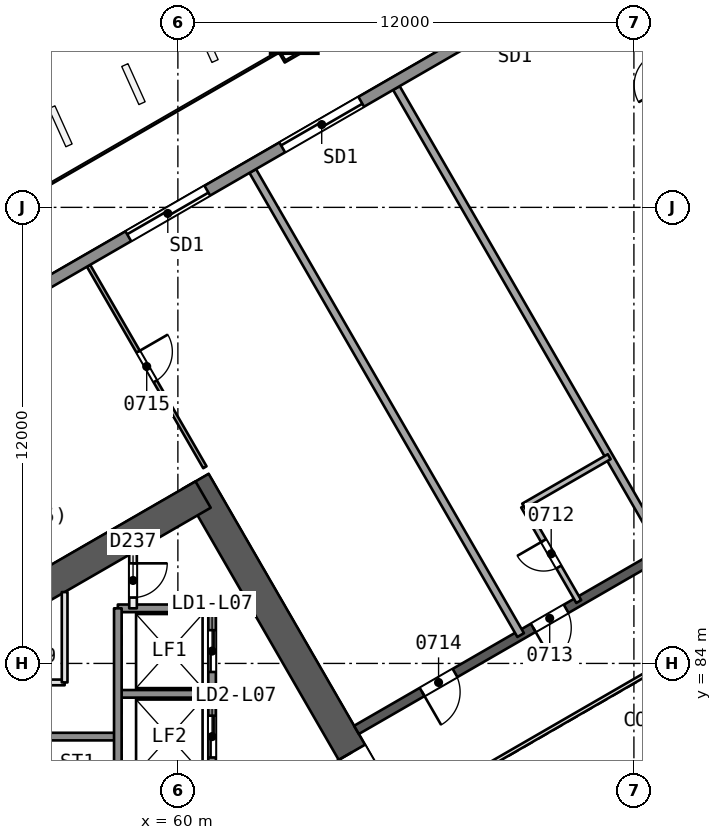
"""IFC4 building model, lengths in metres.
Left out: names, types, materials, properties, quantities, classifications, styles, units other than length and angle.
Written with IfcOpenShell. Run it as: python <this file> out.ifc"""

import sys

from ifc_helpers import new_model, si_unit, direction, frame, frame_2d, origin, origin_2d, place, context, subcontext, project, spatial, rectangle, extrude, element, fill, save


model = new_model("IFC4")
c1 = context("Model", 3, precision=1e-05, world=origin(), true_north=direction((0.0, 1.0)))
c2 = subcontext(c1, "Body", "Model", "MODEL_VIEW")
j1 = project(units=[si_unit("LENGTHUNIT", "METRE"), si_unit("PLANEANGLEUNIT", "RADIAN")], contexts=[c1])
p1 = place(None, origin())
s1 = spatial("IfcSite", under=j1, at=p1, CompositionType="ELEMENT")
p2 = place(p1, origin())
s2 = spatial("IfcBuilding", under=s1, at=p2, CompositionType="ELEMENT")
p3 = place(p2, frame((0.0, 0.0, 37.4)))
s3 = spatial("IfcBuildingStorey", under=s2, at=p3, CompositionType="ELEMENT", Elevation=37.4)
p4 = place(p3, frame((65.538, 80.0, 0.0), z_axis=(0.0, 0.0, 1.0), x_axis=(-0.49999662545, 0.866027352073, 0.0)))
e1 = element("IfcWall", 1, at=p4, inside=s3, PredefinedType="SHEAR", context=c2, shape_type="SweptSolid", body=[
    extrude(rectangle(XDim=10.149, YDim=0.8, at=frame_2d((5.074, 0.0))), origin(), (0.0, 0.0, 1.0), 3.7),
])
p5 = place(p4, frame((0.719, 0.0, 0.0)))
e2 = element("IfcOpeningElement", 2, at=p5, cuts=e1, PredefinedType="OPENING", context=c2, shape_type="SweptSolid", body=[
    extrude(rectangle(XDim=1.2, YDim=2.1, at=frame_2d((0.6, 1.05))), frame((0.0, 0.411, 0.0), z_axis=(0.0, -1.0, 0.0), x_axis=(1.0, 0.0, 0.0)), (0.0, 0.0, 1.0), 0.821),
])
p6 = place(p3, frame((60.664, 88.443, 0.0), z_axis=(0.0, 0.0, 1.0), x_axis=(-0.866029478545, -0.499992942241, 0.0)))
e3 = element("IfcWall", 3, at=p6, inside=s3, PredefinedType="SHEAR", context=c2, shape_type="SweptSolid", body=[
    extrude(rectangle(XDim=13.933, YDim=0.8, at=frame_2d((6.967, 0.0))), origin(), (0.0, 0.0, 1.0), 3.7),
])
p7 = place(p3, frame((78.2, 90.046, 0.0), z_axis=(0.0, 0.0, 1.0), x_axis=(-0.866026492143, -0.499998114903, 0.0)))
e4 = element("IfcWall", 4, at=p7, inside=s3, PredefinedType="SHEAR", context=c2, shape_type="SweptSolid", body=[
    extrude(rectangle(XDim=15.588, YDim=0.25, at=frame_2d((7.794, 0.0))), origin(), (0.0, 0.0, 1.0), 3.2),
])
p8 = place(p7, frame((2.618, 0.0, 0.0)))
e5 = element("IfcOpeningElement", 5, at=p8, cuts=e4, PredefinedType="OPENING", context=c2, shape_type="SweptSolid", body=[
    extrude(rectangle(XDim=1.0, YDim=2.1, at=frame_2d((0.5, 1.05))), frame((0.0, 0.135, 0.0), z_axis=(0.0, -1.0, 0.0), x_axis=(1.0, 0.0, 0.0)), (0.0, 0.0, 1.0), 0.271),
])
p9 = place(p7, frame((9.218, 0.0, 0.0)))
e6 = element("IfcOpeningElement", 6, at=p9, cuts=e4, PredefinedType="OPENING", context=c2, shape_type="SweptSolid", body=[
    extrude(rectangle(XDim=1.0, YDim=2.1, at=frame_2d((0.5, 1.05))), frame((0.0, 0.135, 0.0), z_axis=(0.0, -1.0, 0.0), x_axis=(1.0, 0.0, 0.0)), (0.0, 0.0, 1.0), 0.271),
])
p10 = place(p7, frame((12.594, 0.0, 0.0)))
e7 = element("IfcOpeningElement", 7, at=p10, cuts=e4, PredefinedType="OPENING", context=c2, shape_type="SweptSolid", body=[
    extrude(rectangle(XDim=1.0, YDim=2.1, at=frame_2d((0.5, 1.05))), frame((0.0, 0.135, 0.0), z_axis=(0.0, -1.0, 0.0), x_axis=(1.0, 0.0, 0.0)), (0.0, 0.0, 1.0), 0.271),
])
p11 = place(p3, frame((63.05, 100.698, 0.0), z_axis=(0.010092954999, -0.017481261926, 0.999796248113), x_axis=(-0.499897099477, 0.865849541015, 0.020185694417)))
e8 = element("IfcColumn", 8, at=p11, inside=s3, PredefinedType="COLUMN", context=c2, shape_type="SweptSolid", body=[
    extrude(rectangle(XDim=1.2, YDim=1.2, at=origin_2d()), origin(), (0.0, 0.0, 1.0), 3.701),
])
p12 = place(p3, frame((74.21, 96.956, 0.0), z_axis=(0.0, 0.0, 1.0), x_axis=(-0.499985929336, 0.866033527334, 0.0)))
e9 = element("IfcWall", 9, at=p12, inside=s3, PredefinedType="PARTITIONING", context=c2, shape_type="SweptSolid", body=[
    extrude(rectangle(XDim=6.123, YDim=0.1, at=frame_2d((3.062, 0.0))), origin(), (0.0, 0.0, 1.0), 3.2),
])
p13 = place(p12, frame((2.611, 0.0, 0.0)))
e10 = element("IfcOpeningElement", 10, at=p13, cuts=e9, PredefinedType="OPENING", context=c2, shape_type="SweptSolid", body=[
    extrude(rectangle(XDim=0.9, YDim=2.1, at=frame_2d((0.45, 1.05))), frame((0.0, 0.061, 0.0), z_axis=(0.0, -1.0, 0.0), x_axis=(1.0, 0.0, 0.0)), (0.0, 0.0, 1.0), 0.121),
])
p14 = place(p3, frame((65.749, 99.141, 0.0), z_axis=(0.0, 0.0, 1.0), x_axis=(0.499997206141, -0.866027016814, 0.0)))
e11 = element("IfcWall", 11, at=p14, inside=s3, PredefinedType="PARTITIONING", context=c2, shape_type="SweptSolid", body=[
    extrude(rectangle(XDim=14.102, YDim=0.2, at=frame_2d((7.051, 0.0))), origin(), (0.0, 0.0, 1.0), 3.2),
])
p15 = place(p3, frame((70.548, 85.628, 0.0), z_axis=(0.0, 0.0, 1.0), x_axis=(-0.499987231761, 0.866032775405, 0.0)))
e12 = element("IfcWall", 12, at=p15, inside=s3, PredefinedType="PARTITIONING", context=c2, shape_type="SweptSolid", body=[
    extrude(rectangle(XDim=2.9, YDim=0.15, at=frame_2d((1.45, 0.0))), origin(), (0.0, 0.0, 1.0), 3.2),
])
p16 = place(p15, frame((1.05, 0.0, 0.0)))
e13 = element("IfcOpeningElement", 13, at=p16, cuts=e12, PredefinedType="OPENING", context=c2, shape_type="SweptSolid", body=[
    extrude(rectangle(XDim=0.8, YDim=2.1, at=frame_2d((0.4, 1.05))), frame((0.0, 0.085, 0.0), z_axis=(0.0, -1.0, 0.0), x_axis=(1.0, 0.0, 0.0)), (0.0, 0.0, 1.0), 0.171),
])
p17 = place(p3, frame((69.098, 88.14, 0.0), z_axis=(0.0, 0.0, 1.0), x_axis=(0.866021400173, 0.500006934395, 0.0)))
e14 = element("IfcWall", 14, at=p17, inside=s3, PredefinedType="PARTITIONING", context=c2, shape_type="SweptSolid", body=[
    extrude(rectangle(XDim=2.6, YDim=0.15, at=frame_2d((1.3, 0.0))), origin(), (0.0, 0.0, 1.0), 3.2),
])
p18 = place(p3, frame((61.969, 96.958, 0.0), z_axis=(0.0, 0.0, 1.0), x_axis=(0.499997206141, -0.866027016814, 0.0)))
e15 = element("IfcWall", 15, at=p18, inside=s3, PredefinedType="PARTITIONING", context=c2, shape_type="SweptSolid", body=[
    extrude(rectangle(XDim=14.102, YDim=0.2, at=frame_2d((7.051, 0.0))), origin(), (0.0, 0.0, 1.0), 3.2),
])
p19 = place(p3, frame((57.649, 94.464, 0.0), z_axis=(0.0, 0.0, 1.0), x_axis=(0.499985929336, -0.866033527334, 0.0)))
e16 = element("IfcWall", 16, at=p19, inside=s3, PredefinedType="PARTITIONING", context=c2, shape_type="SweptSolid", body=[
    extrude(rectangle(XDim=6.123, YDim=0.1, at=frame_2d((3.062, 0.0))), origin(), (0.0, 0.0, 1.0), 3.2),
])
p20 = place(p19, frame((2.611, 0.0, 0.0)))
e17 = element("IfcOpeningElement", 17, at=p20, cuts=e16, PredefinedType="OPENING", context=c2, shape_type="SweptSolid", body=[
    extrude(rectangle(XDim=0.9, YDim=2.1, at=frame_2d((0.45, 1.05))), frame((0.0, 0.061, 0.0), z_axis=(0.0, -1.0, 0.0), x_axis=(1.0, 0.0, 0.0)), (0.0, 0.0, 1.0), 0.121),
])
p21 = place(p3, frame((37.74, 83.141, 0.0), z_axis=(0.0, 0.0, 1.0), x_axis=(0.866026524777, 0.499998058379, 0.0)))
e18 = element("IfcWall", 18, at=p21, inside=s3, PredefinedType="SOLIDWALL", context=c2, shape_type="SweptSolid", body=[
    extrude(rectangle(XDim=61.395, YDim=0.3, at=frame_2d((30.698, 0.0))), origin(), (0.0, 0.0, 1.0), 3.2),
])
p22 = place(p21, frame((34.174, 0.0, 0.0)))
e19 = element("IfcOpeningElement", 19, at=p22, cuts=e18, PredefinedType="OPENING", context=c2, shape_type="SweptSolid", body=[
    extrude(rectangle(XDim=2.4, YDim=2.4, at=frame_2d((1.2, 1.2))), frame((0.0, 0.161, 0.0), z_axis=(0.0, -1.0, 0.0), x_axis=(1.0, 0.0, 0.0)), (0.0, 0.0, 1.0), 0.321),
])
p23 = place(p21, frame((47.603, 0.0, 0.0)))
e20 = element("IfcOpeningElement", 20, at=p23, cuts=e18, PredefinedType="OPENING", context=c2, shape_type="SweptSolid", body=[
    extrude(rectangle(XDim=2.4, YDim=2.4, at=frame_2d((1.2, 1.2))), frame((0.0, 0.161, 0.0), z_axis=(0.0, -1.0, 0.0), x_axis=(1.0, 0.0, 0.0)), (0.0, 0.0, 1.0), 0.321),
])
p24 = place(p21, frame((24.198, 0.0, 0.0)))
e21 = element("IfcOpeningElement", 21, at=p24, cuts=e18, PredefinedType="OPENING", context=c2, shape_type="SweptSolid", body=[
    extrude(rectangle(XDim=2.4, YDim=2.4, at=frame_2d((1.2, 1.2))), frame((0.0, 0.161, 0.0), z_axis=(0.0, -1.0, 0.0), x_axis=(1.0, 0.0, 0.0)), (0.0, 0.0, 1.0), 0.321),
])
p25 = place(p21, frame((11.394, 0.0, 0.0)))
e22 = element("IfcOpeningElement", 22, at=p25, cuts=e18, PredefinedType="OPENING", context=c2, shape_type="SweptSolid", body=[
    extrude(rectangle(XDim=2.4, YDim=2.4, at=frame_2d((1.2, 1.2))), frame((0.0, 0.161, 0.0), z_axis=(0.0, -1.0, 0.0), x_axis=(1.0, 0.0, 0.0)), (0.0, 0.0, 1.0), 0.321),
])
p26 = place(p21, frame((28.874, 0.0, 0.0)))
e23 = element("IfcOpeningElement", 23, at=p26, cuts=e18, PredefinedType="OPENING", context=c2, shape_type="SweptSolid", body=[
    extrude(rectangle(XDim=2.4, YDim=2.4, at=frame_2d((1.2, 1.2))), frame((0.0, 0.161, 0.0), z_axis=(0.0, -1.0, 0.0), x_axis=(1.0, 0.0, 0.0)), (0.0, 0.0, 1.0), 0.321),
])
p27 = place(p3, frame((60.9, 85.45, 0.0), z_axis=(0.0, 0.0, 1.0), x_axis=(-1.0, 0.0, 0.0)))
e24 = element("IfcWall", 24, at=p27, inside=s3, PredefinedType="SOLIDWALL", context=c2, shape_type="SweptSolid", body=[
    extrude(rectangle(XDim=2.48, YDim=0.2, at=frame_2d((1.24, 0.0))), origin(), (0.0, 0.0, 1.0), 3.2),
])
p28 = place(p3, frame((57.02, 83.5, 0.0), z_axis=(0.0, 0.0, 1.0), x_axis=(-1.0, 0.0, 0.0)))
e25 = element("IfcWall", 25, at=p28, inside=s3, PredefinedType="PARTITIONING", context=c2, shape_type="SweptSolid", body=[
    extrude(rectangle(XDim=1.6, YDim=0.15, at=frame_2d((0.8, 0.0))), origin(), (0.0, 0.0, 1.0), 3.2),
])
p29 = place(p28, frame((0.387, 0.0, 0.0)))
e26 = element("IfcOpeningElement", 26, at=p29, cuts=e25, PredefinedType="OPENING", context=c2, shape_type="SweptSolid", body=[
    extrude(rectangle(XDim=0.9, YDim=2.1, at=frame_2d((0.45, 1.05))), frame((0.0, 0.085, 0.0), z_axis=(0.0, -1.0, 0.0), x_axis=(1.0, 0.0, 0.0)), (0.0, 0.0, 1.0), 0.171),
])
p30 = place(p3, frame((60.9, 83.2, 0.0), z_axis=(0.0, 0.0, 1.0), x_axis=(-1.0, 0.0, 0.0)))
e27 = element("IfcWall", 27, at=p30, inside=s3, PredefinedType="SOLIDWALL", context=c2, shape_type="SweptSolid", body=[
    extrude(rectangle(XDim=2.48, YDim=0.2, at=frame_2d((1.24, 0.0))), origin(), (0.0, 0.0, 1.0), 3.2),
])
p31 = place(p3, frame((58.42, 82.075, 0.0), z_axis=(0.0, 0.0, 1.0), x_axis=(-1.0, 0.0, 0.0)))
e28 = element("IfcWall", 28, at=p31, inside=s3, PredefinedType="SOLIDWALL", context=c2, shape_type="SweptSolid", body=[
    extrude(rectangle(XDim=7.7, YDim=0.2, at=frame_2d((3.85, 0.0))), origin(), (0.0, 0.0, 1.0), 3.2),
])
p32 = place(p3, frame((60.9, 85.45, 0.0), z_axis=(0.0, 0.0, 1.0), x_axis=(0.0, -1.0, 0.0)))
e29 = element("IfcWall", 29, at=p32, inside=s3, PredefinedType="SOLIDWALL", context=c2, shape_type="SweptSolid", body=[
    extrude(rectangle(XDim=10.9, YDim=0.2, at=frame_2d((5.45, 0.0))), origin(), (0.0, 0.0, 1.0), 3.2),
])
p33 = place(p32, frame((0.575, 0.0, 0.0)))
e30 = element("IfcOpeningElement", 30, at=p33, cuts=e29, PredefinedType="OPENING", context=c2, shape_type="SweptSolid", body=[
    extrude(rectangle(XDim=1.1, YDim=2.1, at=frame_2d((0.55, 1.05))), frame((0.0, 0.11, 0.0), z_axis=(0.0, -1.0, 0.0), x_axis=(1.0, 0.0, 0.0)), (0.0, 0.0, 1.0), 0.221),
])
p34 = place(p32, frame((2.825, 0.0, 0.0)))
e31 = element("IfcOpeningElement", 31, at=p34, cuts=e29, PredefinedType="OPENING", context=c2, shape_type="SweptSolid", body=[
    extrude(rectangle(XDim=1.1, YDim=2.1, at=frame_2d((0.55, 1.05))), frame((0.0, 0.11, 0.0), z_axis=(0.0, -1.0, 0.0), x_axis=(1.0, 0.0, 0.0)), (0.0, 0.0, 1.0), 0.221),
])
p35 = place(p32, frame((5.075, 0.0, 0.0)))
e32 = element("IfcOpeningElement", 32, at=p35, cuts=e29, PredefinedType="OPENING", context=c2, shape_type="SweptSolid", body=[
    extrude(rectangle(XDim=1.1, YDim=2.1, at=frame_2d((0.55, 1.05))), frame((0.0, 0.11, 0.0), z_axis=(0.0, -1.0, 0.0), x_axis=(1.0, 0.0, 0.0)), (0.0, 0.0, 1.0), 0.221),
])
p36 = place(p32, frame((7.325, 0.0, 0.0)))
e33 = element("IfcOpeningElement", 33, at=p36, cuts=e29, PredefinedType="OPENING", context=c2, shape_type="SweptSolid", body=[
    extrude(rectangle(XDim=1.1, YDim=2.1, at=frame_2d((0.55, 1.05))), frame((0.0, 0.11, 0.0), z_axis=(0.0, -1.0, 0.0), x_axis=(1.0, 0.0, 0.0)), (0.0, 0.0, 1.0), 0.221),
])
p37 = place(p3, frame((58.82, 86.917, 0.0), z_axis=(0.0, 0.0, 1.0), x_axis=(0.0, -1.0, 0.0)))
e34 = element("IfcWall", 34, at=p37, inside=s3, PredefinedType="PARTITIONING", context=c2, shape_type="SweptSolid", body=[
    extrude(rectangle(XDim=1.467, YDim=0.2, at=frame_2d((0.733, 0.0))), origin(), (0.0, 0.0, 1.0), 3.2),
])
p38 = place(p37, frame((0.283, 0.0, 0.0)))
e35 = element("IfcOpeningElement", 35, at=p38, cuts=e34, PredefinedType="OPENING", context=c2, shape_type="SweptSolid", body=[
    extrude(rectangle(XDim=0.9, YDim=2.1, at=frame_2d((0.45, 1.05))), frame((0.0, 0.11, 0.0), z_axis=(0.0, -1.0, 0.0), x_axis=(1.0, 0.0, 0.0)), (0.0, 0.0, 1.0), 0.221),
])
p39 = place(p3, frame((58.42, 85.45, 0.0), z_axis=(0.0, 0.0, 1.0), x_axis=(0.0, -1.0, 0.0)))
e36 = element("IfcWall", 36, at=p39, inside=s3, PredefinedType="SOLIDWALL", context=c2, shape_type="SweptSolid", body=[
    extrude(rectangle(XDim=9.0, YDim=0.2, at=frame_2d((4.5, 0.0))), origin(), (0.0, 0.0, 1.0), 3.2),
])
p40 = place(p3, frame((57.02, 85.877, 0.0), z_axis=(0.0, 0.0, 1.0), x_axis=(0.0, -1.0, 0.0)))
e37 = element("IfcWall", 37, at=p40, inside=s3, PredefinedType="PARTITIONING", context=c2, shape_type="SweptSolid", body=[
    extrude(rectangle(XDim=2.377, YDim=0.15, at=frame_2d((1.189, 0.0))), origin(), (0.0, 0.0, 1.0), 3.2),
])
p41 = place(p3, frame((77.738, 86.846, 0.0), z_axis=(0.0, 0.0, 1.0), x_axis=(-0.866026658274, -0.499997827154, 0.0)))
e38 = element("IfcWall", 38, at=p41, inside=s3, PredefinedType="PARTITIONING", context=c2, shape_type="SweptSolid", body=[
    extrude(rectangle(XDim=11.588, YDim=0.1, at=frame_2d((5.794, 0.0))), origin(), (0.0, 0.0, 1.0), 3.2),
])
p42 = place(p16, origin())
e39 = element("IfcDoor", 39, at=p42, inside=s3, OperationType="SINGLE_SWING_RIGHT", PredefinedType="NOTDEFINED", context=c2, shape_type="SweptSolid", body=[
    extrude(rectangle(XDim=0.8, YDim=2.1, at=frame_2d((0.4, 1.05))), frame((0.0, 0.025, 0.0), z_axis=(0.0, -1.0, 0.0), x_axis=(1.0, 0.0, 0.0)), (0.0, 0.0, 1.0), 0.05),
])
fill(e13, e39)
p43 = place(p9, origin())
e40 = element("IfcDoor", 40, at=p43, inside=s3, OperationType="SINGLE_SWING_RIGHT", PredefinedType="NOTDEFINED", context=c2, shape_type="SweptSolid", body=[
    extrude(rectangle(XDim=1.0, YDim=2.1, at=frame_2d((0.5, 1.05))), frame((0.0, 0.025, 0.0), z_axis=(0.0, -1.0, 0.0), x_axis=(1.0, 0.0, 0.0)), (0.0, 0.0, 1.0), 0.05),
])
fill(e6, e40)
p44 = place(p10, origin())
e41 = element("IfcDoor", 41, at=p44, inside=s3, OperationType="SINGLE_SWING_RIGHT", PredefinedType="NOTDEFINED", context=c2, shape_type="SweptSolid", body=[
    extrude(rectangle(XDim=1.0, YDim=2.1, at=frame_2d((0.5, 1.05))), frame((0.0, 0.025, 0.0), z_axis=(0.0, -1.0, 0.0), x_axis=(1.0, 0.0, 0.0)), (0.0, 0.0, 1.0), 0.05),
])
fill(e7, e41)
p45 = place(p20, origin())
e42 = element("IfcDoor", 42, at=p45, inside=s3, OperationType="SINGLE_SWING_LEFT", PredefinedType="NOTDEFINED", context=c2, shape_type="SweptSolid", body=[
    extrude(rectangle(XDim=0.9, YDim=2.1, at=frame_2d((0.45, 1.05))), frame((0.0, 0.025, 0.0), z_axis=(0.0, -1.0, 0.0), x_axis=(1.0, 0.0, 0.0)), (0.0, 0.0, 1.0), 0.05),
])
fill(e17, e42)
p46 = place(p24, origin())
e43 = element("IfcDoor", 43, at=p46, inside=s3, OperationType="SLIDING_TO_LEFT", PredefinedType="NOTDEFINED", context=c2, shape_type="SweptSolid", body=[
    extrude(rectangle(XDim=2.4, YDim=2.4, at=frame_2d((1.2, 1.2))), frame((0.0, 0.025, 0.0), z_axis=(0.0, -1.0, 0.0), x_axis=(1.0, 0.0, 0.0)), (0.0, 0.0, 1.0), 0.05),
])
fill(e21, e43)
p47 = place(p26, origin())
e44 = element("IfcDoor", 44, at=p47, inside=s3, OperationType="SLIDING_TO_LEFT", PredefinedType="NOTDEFINED", context=c2, shape_type="SweptSolid", body=[
    extrude(rectangle(XDim=2.4, YDim=2.4, at=frame_2d((1.2, 1.2))), frame((0.0, 0.025, 0.0), z_axis=(0.0, -1.0, 0.0), x_axis=(1.0, 0.0, 0.0)), (0.0, 0.0, 1.0), 0.05),
])
fill(e23, e44)
p48 = place(p5, origin())
e45 = element("IfcDoor", 45, at=p48, inside=s3, OperationType="SINGLE_SWING_RIGHT", PredefinedType="NOTDEFINED", context=c2, shape_type="SweptSolid", body=[
    extrude(rectangle(XDim=1.2, YDim=2.1, at=frame_2d((0.6, 1.05))), frame((0.0, 0.025, 0.0), z_axis=(0.0, -1.0, 0.0), x_axis=(1.0, 0.0, 0.0)), (0.0, 0.0, 1.0), 0.05),
])
fill(e2, e45)
p49 = place(p33, origin())
e46 = element("IfcDoor", 46, at=p49, inside=s3, OperationType="SLIDING_TO_RIGHT", PredefinedType="NOTDEFINED", context=c2, shape_type="SweptSolid", body=[
    extrude(rectangle(XDim=1.1, YDim=2.1, at=frame_2d((0.55, 1.05))), frame((0.0, 0.025, 0.0), z_axis=(0.0, -1.0, 0.0), x_axis=(1.0, 0.0, 0.0)), (0.0, 0.0, 1.0), 0.05),
])
fill(e30, e46)
p50 = place(p34, origin())
e47 = element("IfcDoor", 47, at=p50, inside=s3, OperationType="SLIDING_TO_LEFT", PredefinedType="NOTDEFINED", context=c2, shape_type="SweptSolid", body=[
    extrude(rectangle(XDim=1.1, YDim=2.1, at=frame_2d((0.55, 1.05))), frame((0.0, 0.025, 0.0), z_axis=(0.0, -1.0, 0.0), x_axis=(1.0, 0.0, 0.0)), (0.0, 0.0, 1.0), 0.05),
])
fill(e31, e47)
p51 = place(p38, origin())
e48 = element("IfcDoor", 48, at=p51, inside=s3, OperationType="SINGLE_SWING_LEFT", PredefinedType="NOTDEFINED", context=c2, shape_type="SweptSolid", body=[
    extrude(rectangle(XDim=0.9, YDim=2.1, at=frame_2d((0.45, 1.05))), frame((0.0, 0.025, 0.0), z_axis=(0.0, -1.0, 0.0), x_axis=(1.0, 0.0, 0.0)), (0.0, 0.0, 1.0), 0.05),
])
fill(e35, e48)
save(model, sys.argv[1])
